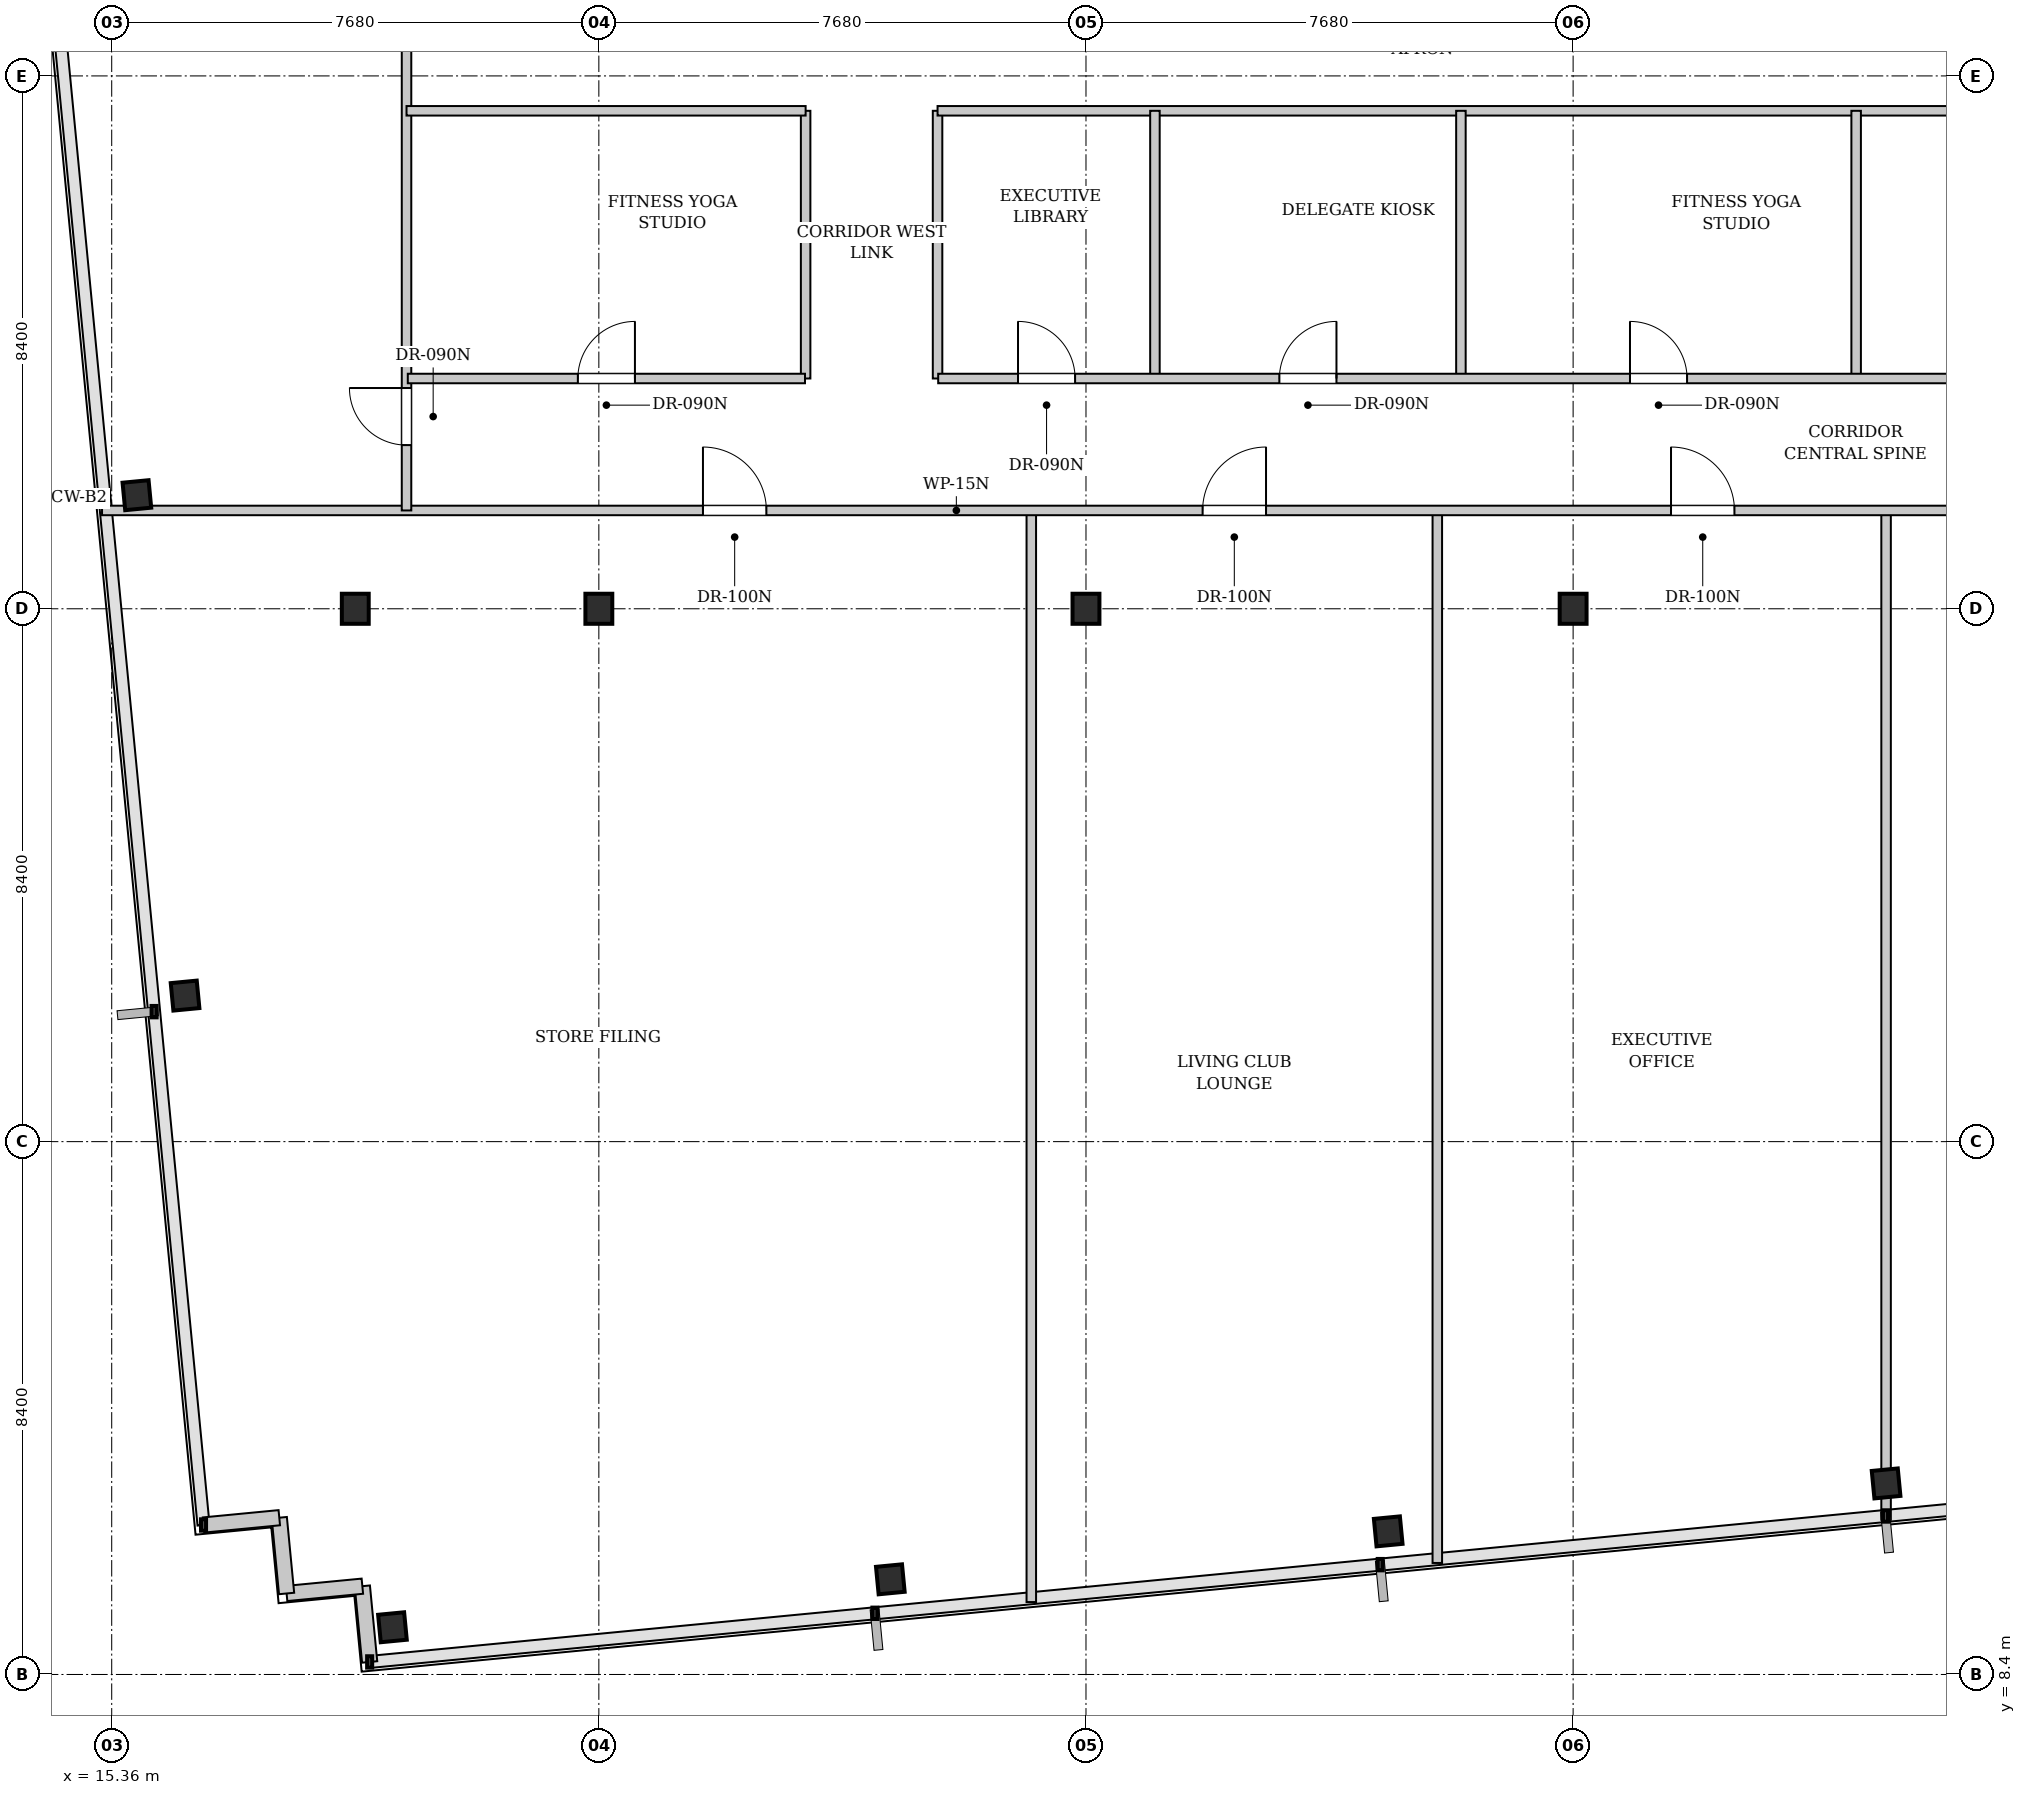
"""IFC4 building model, lengths in metres.
Left out: names, types, materials, properties, quantities, classifications, styles, units other than length and angle.
Written with IfcOpenShell. Run it as: python <this file> out.ifc"""

import sys

from ifc_helpers import new_model, si_unit, direction, frame, frame_2d, origin, origin_2d, place, context, subcontext, project, spatial, rectangle, i_section, extrude, element, fill, save


model = new_model("IFC4")
c1 = context("Model", 3, precision=1e-05, world=origin(), true_north=direction((0.0, 1.0)))
c2 = subcontext(c1, "Body", "Model", "MODEL_VIEW")
j1 = project(units=[si_unit("LENGTHUNIT", "METRE"), si_unit("PLANEANGLEUNIT", "RADIAN")], contexts=[c1])
p1 = place(None, origin())
s1 = spatial("IfcSite", under=j1, at=p1, CompositionType="ELEMENT")
p2 = place(p1, origin())
s2 = spatial("IfcBuilding", under=s1, at=p2, CompositionType="ELEMENT")
p3 = place(p2, frame((0.0, 0.0, 106.7)))
s3 = spatial("IfcBuildingStorey", under=s2, at=p3, CompositionType="ELEMENT", Elevation=106.7)
for number, where, z_axis, x_axis in (
    (1, (23.04, 25.2, 0.0), (0.0, 0.0, 1.0), (1.0, 0.0, 0.0)),
    (2, (30.72, 25.2, 0.0), (0.0, 0.0, 1.0), (1.0, 0.0, 0.0)),
    (3, (38.4, 25.2, 0.0), (0.0, 0.0, 1.0), (1.0, 0.0, 0.0)),
    (4, (19.2, 25.2, 0.0), (0.0, 0.0, 1.0), (1.0, 0.0, 0.0)),
):
    element("IfcColumn", number, at=place(p3, frame(where, z_axis=z_axis, x_axis=x_axis)), inside=s3, PredefinedType="COLUMN", context=c2, shape_type="SweptSolid", body=[
        extrude(i_section(OverallWidth=0.424, OverallDepth=0.474, WebThickness=0.047, FlangeThickness=0.077, FilletRadius=0.015, at=origin_2d()), origin(), (0.0, 0.0, 1.0), 3.4),
    ])
for number, where, z_axis, x_axis in (
    (5, (19.786, 9.144, 0.0), (0.0, 0.0, 1.0), (0.995, 0.096, 0.0)),
    (6, (27.635, 9.9, 0.0), (0.0, 0.0, 1.0), (0.995, 0.096, 0.0)),
    (7, (35.485, 10.656, 0.0), (0.0, 0.0, 1.0), (0.995, 0.096, 0.0)),
    (8, (43.334, 11.412, 0.0), (0.0, 0.0, 1.0), (0.995, 0.096, 0.0)),
    (9, (16.517, 19.102, 0.0), (0.0, 0.0, 1.0), (0.995, 0.096, 0.0)),
    (10, (15.757, 26.99, 0.0), (0.0, 0.0, 1.0), (0.995, 0.096, 0.0)),
):
    element("IfcColumn", number, at=place(p3, frame(where, z_axis=z_axis, x_axis=x_axis)), inside=s3, PredefinedType="COLUMN", context=c2, shape_type="SweptSolid", body=[
        extrude(i_section(OverallWidth=0.412, OverallDepth=0.435, WebThickness=0.036, FlangeThickness=0.058, FilletRadius=0.015, at=origin_2d()), origin(), (0.0, 0.0, 1.0), 3.4),
    ])
for number, where, z_axis, x_axis in (
    (11, (19.427, 8.597, 0.0), (0.0, 0.0, 1.0), (-0.096, 0.995, 0.0)),
    (12, (19.312, 9.792, 0.0), (0.0, 0.0, 1.0), (-0.995, -0.096, 0.0)),
):
    element("IfcWall", number, at=place(p3, frame(where, z_axis=z_axis, x_axis=x_axis)), inside=s3, PredefinedType="SOLIDWALL", context=c2, shape_type="SweptSolid", body=[
        extrude(rectangle(XDim=1.2, YDim=0.24, at=frame_2d((0.6, 0.0))), origin(), (0.0, 0.0, 1.0), 3.18),
    ])
p4 = place(p3, frame((18.117, 9.677, 0.0), z_axis=(0.0, 0.0, 1.0), x_axis=(-0.095836473879, 0.995397091755, 0.0)))
e13 = element("IfcWall", 13, at=p4, inside=s3, PredefinedType="SOLIDWALL", context=c2, shape_type="SweptSolid", body=[
    extrude(rectangle(XDim=1.2, YDim=0.24, at=frame_2d((0.6, 0.0))), origin(), (0.0, 0.0, 1.0), 3.18),
])
p5 = place(p3, frame((18.002, 10.871, 0.0), z_axis=(0.0, 0.0, 1.0), x_axis=(-0.995398960025, -0.095817067274, 0.0)))
e14 = element("IfcWall", 14, at=p5, inside=s3, PredefinedType="SOLIDWALL", context=c2, shape_type="SweptSolid", body=[
    extrude(rectangle(XDim=1.2, YDim=0.24, at=frame_2d((0.6, 0.0))), origin(), (0.0, 0.0, 1.0), 3.18),
])
p6 = place(p3, frame((29.858, 9.542, 0.0), z_axis=(0.0, 0.0, 1.0), x_axis=(0.0, 1.0, 0.0)))
e15 = element("IfcWall", 15, at=p6, inside=s3, PredefinedType="PARTITIONING", context=c2, shape_type="SweptSolid", body=[
    extrude(rectangle(XDim=17.229, YDim=0.15, at=frame_2d((8.614, 0.0))), origin(), (0.0, 0.0, 1.0), 2.525),
])
p7 = place(p3, frame((36.259, 10.158, 0.0), z_axis=(0.0, 0.0, 1.0), x_axis=(0.0, 1.0, 0.0)))
e16 = element("IfcWall", 16, at=p7, inside=s3, PredefinedType="PARTITIONING", context=c2, shape_type="SweptSolid", body=[
    extrude(rectangle(XDim=16.612, YDim=0.15, at=frame_2d((8.306, 0.0))), origin(), (0.0, 0.0, 1.0), 2.525),
])
p8 = place(p3, frame((43.334, 10.839, 0.0), z_axis=(0.0, 0.0, 1.0), x_axis=(0.0, 1.0, 0.0)))
e17 = element("IfcWall", 17, at=p8, inside=s3, PredefinedType="PARTITIONING", context=c2, shape_type="SweptSolid", body=[
    extrude(rectangle(XDim=15.931, YDim=0.15, at=frame_2d((7.965, 0.0))), origin(), (0.0, 0.0, 1.0), 2.525),
])
p9 = place(p3, frame((15.208, 26.75, 0.0), z_axis=(0.0, 0.0, 1.0), x_axis=(1.0, 0.0, 0.0)))
e18 = element("IfcWall", 18, at=p9, inside=s3, PredefinedType="PARTITIONING", context=c2, shape_type="SweptSolid", body=[
    extrude(rectangle(XDim=61.222, YDim=0.15, at=frame_2d((30.611, 0.0))), origin(), (0.0, 0.0, 1.0), 2.525),
])
p10 = place(p9, frame((9.474, 0.0, 0.0)))
e19 = element("IfcOpeningElement", 19, at=p10, cuts=e18, PredefinedType="OPENING", context=c2, shape_type="SweptSolid", body=[
    extrude(rectangle(XDim=1.0, YDim=2.15, at=frame_2d((0.5, 1.075))), frame((0.0, 0.085, 0.0), z_axis=(0.0, -1.0, 0.0), x_axis=(1.0, 0.0, 0.0)), (0.0, 0.0, 1.0), 0.17),
])
p11 = place(p9, frame((17.351, 0.0, 0.0)))
e20 = element("IfcOpeningElement", 20, at=p11, cuts=e18, PredefinedType="OPENING", context=c2, shape_type="SweptSolid", body=[
    extrude(rectangle(XDim=1.0, YDim=2.15, at=frame_2d((0.5, 1.075))), frame((0.0, 0.085, 0.0), z_axis=(0.0, -1.0, 0.0), x_axis=(1.0, 0.0, 0.0)), (0.0, 0.0, 1.0), 0.17),
])
p12 = place(p9, frame((24.736, 0.0, 0.0)))
e21 = element("IfcOpeningElement", 21, at=p12, cuts=e18, PredefinedType="OPENING", context=c2, shape_type="SweptSolid", body=[
    extrude(rectangle(XDim=1.0, YDim=2.15, at=frame_2d((0.5, 1.075))), frame((0.0, 0.085, 0.0), z_axis=(0.0, -1.0, 0.0), x_axis=(1.0, 0.0, 0.0)), (0.0, 0.0, 1.0), 0.17),
])
p13 = place(p9, frame((32.429, 0.0, 0.0)))
e22 = element("IfcOpeningElement", 22, at=p13, cuts=e18, PredefinedType="OPENING", context=c2, shape_type="SweptSolid", body=[
    extrude(rectangle(XDim=1.0, YDim=2.15, at=frame_2d((0.5, 1.075))), frame((0.0, 0.085, 0.0), z_axis=(0.0, -1.0, 0.0), x_axis=(1.0, 0.0, 0.0)), (0.0, 0.0, 1.0), 0.17),
])
p14 = place(p9, frame((35.993, 0.0, 0.0)))
e23 = element("IfcOpeningElement", 23, at=p14, cuts=e18, PredefinedType="OPENING", context=c2, shape_type="SweptSolid", body=[
    extrude(rectangle(XDim=1.0, YDim=2.15, at=frame_2d((0.5, 1.075))), frame((0.0, 0.085, 0.0), z_axis=(0.0, -1.0, 0.0), x_axis=(1.0, 0.0, 0.0)), (0.0, 0.0, 1.0), 0.17),
])
p15 = place(p9, frame((43.982, 0.0, 0.0)))
e24 = element("IfcOpeningElement", 24, at=p15, cuts=e18, PredefinedType="OPENING", context=c2, shape_type="SweptSolid", body=[
    extrude(rectangle(XDim=1.0, YDim=2.15, at=frame_2d((0.5, 1.075))), frame((0.0, 0.085, 0.0), z_axis=(0.0, -1.0, 0.0), x_axis=(1.0, 0.0, 0.0)), (0.0, 0.0, 1.0), 0.17),
])
p16 = place(p9, frame((50.267, 0.0, 0.0)))
e25 = element("IfcOpeningElement", 25, at=p16, cuts=e18, PredefinedType="OPENING", context=c2, shape_type="SweptSolid", body=[
    extrude(rectangle(XDim=1.0, YDim=2.15, at=frame_2d((0.5, 1.075))), frame((0.0, 0.085, 0.0), z_axis=(0.0, -1.0, 0.0), x_axis=(1.0, 0.0, 0.0)), (0.0, 0.0, 1.0), 0.17),
])
p17 = place(p3, frame((20.008, 26.75, 0.0), z_axis=(0.0, 0.0, 1.0), x_axis=(0.0, 1.0, 0.0)))
e26 = element("IfcWall", 26, at=p17, inside=s3, PredefinedType="PARTITIONING", context=c2, shape_type="SweptSolid", body=[
    extrude(rectangle(XDim=19.456, YDim=0.15, at=frame_2d((9.728, 0.0))), origin(), (0.0, 0.0, 1.0), 3.18),
])
p18 = place(p17, frame((1.03, 0.0, 0.0)))
e27 = element("IfcOpeningElement", 27, at=p18, cuts=e26, PredefinedType="OPENING", context=c2, shape_type="SweptSolid", body=[
    extrude(rectangle(XDim=0.9, YDim=2.15, at=frame_2d((0.45, 1.075))), frame((0.0, 0.085, 0.0), z_axis=(0.0, -1.0, 0.0), x_axis=(1.0, 0.0, 0.0)), (0.0, 0.0, 1.0), 0.17),
])
for number, where, z_axis, x_axis in (
    (28, (26.3, 28.83, 0.0), (0.0, 0.0, 1.0), (0.0, 1.0, 0.0)),
    (29, (28.38, 28.83, 0.0), (0.0, 0.0, 1.0), (0.0, 1.0, 0.0)),
):
    element("IfcWall", number, at=place(p3, frame(where, z_axis=z_axis, x_axis=x_axis)), inside=s3, PredefinedType="PARTITIONING", context=c2, shape_type="SweptSolid", body=[
        extrude(rectangle(XDim=4.22, YDim=0.15, at=frame_2d((2.11, 0.0))), origin(), (0.0, 0.0, 1.0), 3.18),
    ])
p19 = place(p3, frame((20.008, 33.05, 0.0), z_axis=(0.0, 0.0, 1.0), x_axis=(1.0, 0.0, 0.0)))
e30 = element("IfcWall", 30, at=p19, inside=s3, PredefinedType="PARTITIONING", context=c2, shape_type="SweptSolid", body=[
    extrude(rectangle(XDim=6.292, YDim=0.15, at=frame_2d((3.146, 0.0))), origin(), (0.0, 0.0, 1.0), 3.18),
])
p20 = place(p3, frame((28.38, 33.05, 0.0), z_axis=(0.0, 0.0, 1.0), x_axis=(1.0, 0.0, 0.0)))
e31 = element("IfcWall", 31, at=p20, inside=s3, PredefinedType="PARTITIONING", context=c2, shape_type="SweptSolid", body=[
    extrude(rectangle(XDim=20.12, YDim=0.15, at=frame_2d((10.06, 0.0))), origin(), (0.0, 0.0, 1.0), 3.18),
])
p21 = place(p3, frame((20.028, 28.83, 0.0), z_axis=(0.0, 0.0, 1.0), x_axis=(1.0, 0.0, 0.0)))
e32 = element("IfcWall", 32, at=p21, inside=s3, PredefinedType="PARTITIONING", context=c2, shape_type="SweptSolid", body=[
    extrude(rectangle(XDim=6.262, YDim=0.15, at=frame_2d((3.131, 0.0))), origin(), (0.0, 0.0, 1.0), 3.18),
])
p22 = place(p21, frame((2.681, 0.0, 0.0)))
e33 = element("IfcOpeningElement", 33, at=p22, cuts=e32, PredefinedType="OPENING", context=c2, shape_type="SweptSolid", body=[
    extrude(rectangle(XDim=0.9, YDim=2.15, at=frame_2d((0.45, 1.075))), frame((0.0, 0.085, 0.0), z_axis=(0.0, -1.0, 0.0), x_axis=(1.0, 0.0, 0.0)), (0.0, 0.0, 1.0), 0.17),
])
for number, where, z_axis, x_axis in (
    (34, (31.807, 28.83, 0.0), (0.0, 0.0, 1.0), (0.0, 1.0, 0.0)),
    (35, (36.631, 28.83, 0.0), (0.0, 0.0, 1.0), (0.0, 1.0, 0.0)),
    (36, (42.862, 28.83, 0.0), (0.0, 0.0, 1.0), (0.0, 1.0, 0.0)),
):
    element("IfcWall", number, at=place(p3, frame(where, z_axis=z_axis, x_axis=x_axis)), inside=s3, PredefinedType="PARTITIONING", context=c2, shape_type="SweptSolid", body=[
        extrude(rectangle(XDim=4.22, YDim=0.15, at=frame_2d((2.11, 0.0))), origin(), (0.0, 0.0, 1.0), 3.18),
    ])
p23 = place(p3, frame((28.39, 28.83, 0.0), z_axis=(0.0, 0.0, 1.0), x_axis=(1.0, 0.0, 0.0)))
e37 = element("IfcWall", 37, at=p23, inside=s3, PredefinedType="PARTITIONING", context=c2, shape_type="SweptSolid", body=[
    extrude(rectangle(XDim=20.1, YDim=0.15, at=frame_2d((10.05, 0.0))), origin(), (0.0, 0.0, 1.0), 3.18),
])
p24 = place(p23, frame((1.259, 0.0, 0.0)))
e38 = element("IfcOpeningElement", 38, at=p24, cuts=e37, PredefinedType="OPENING", context=c2, shape_type="SweptSolid", body=[
    extrude(rectangle(XDim=0.9, YDim=2.15, at=frame_2d((0.45, 1.075))), frame((0.0, 0.085, 0.0), z_axis=(0.0, -1.0, 0.0), x_axis=(1.0, 0.0, 0.0)), (0.0, 0.0, 1.0), 0.17),
])
p25 = place(p23, frame((5.379, 0.0, 0.0)))
e39 = element("IfcOpeningElement", 39, at=p25, cuts=e37, PredefinedType="OPENING", context=c2, shape_type="SweptSolid", body=[
    extrude(rectangle(XDim=0.9, YDim=2.15, at=frame_2d((0.45, 1.075))), frame((0.0, 0.085, 0.0), z_axis=(0.0, -1.0, 0.0), x_axis=(1.0, 0.0, 0.0)), (0.0, 0.0, 1.0), 0.17),
])
p26 = place(p23, frame((10.906, 0.0, 0.0)))
e40 = element("IfcOpeningElement", 40, at=p26, cuts=e37, PredefinedType="OPENING", context=c2, shape_type="SweptSolid", body=[
    extrude(rectangle(XDim=0.9, YDim=2.15, at=frame_2d((0.45, 1.075))), frame((0.0, 0.085, 0.0), z_axis=(0.0, -1.0, 0.0), x_axis=(1.0, 0.0, 0.0)), (0.0, 0.0, 1.0), 0.17),
])
p27 = place(p23, frame((16.836, 0.0, 0.0)))
e41 = element("IfcOpeningElement", 41, at=p27, cuts=e37, PredefinedType="OPENING", context=c2, shape_type="SweptSolid", body=[
    extrude(rectangle(XDim=0.9, YDim=2.15, at=frame_2d((0.45, 1.075))), frame((0.0, 0.085, 0.0), z_axis=(0.0, -1.0, 0.0), x_axis=(1.0, 0.0, 0.0)), (0.0, 0.0, 1.0), 0.17),
])
p28 = place(p10, origin())
e42 = element("IfcDoor", 42, at=p28, inside=s3, OperationType="SINGLE_SWING_LEFT", PredefinedType="DOOR", context=c2, shape_type="SweptSolid", body=[
    extrude(rectangle(XDim=1.0, YDim=2.15, at=frame_2d((0.5, 1.075))), frame((0.0, 0.025, 0.0), z_axis=(0.0, -1.0, 0.0), x_axis=(1.0, 0.0, 0.0)), (0.0, 0.0, 1.0), 0.05),
])
fill(e19, e42)
p29 = place(p11, origin())
e43 = element("IfcDoor", 43, at=p29, inside=s3, OperationType="SINGLE_SWING_RIGHT", PredefinedType="DOOR", context=c2, shape_type="SweptSolid", body=[
    extrude(rectangle(XDim=1.0, YDim=2.15, at=frame_2d((0.5, 1.075))), frame((0.0, 0.025, 0.0), z_axis=(0.0, -1.0, 0.0), x_axis=(1.0, 0.0, 0.0)), (0.0, 0.0, 1.0), 0.05),
])
fill(e20, e43)
p30 = place(p12, origin())
e44 = element("IfcDoor", 44, at=p30, inside=s3, OperationType="SINGLE_SWING_LEFT", PredefinedType="DOOR", context=c2, shape_type="SweptSolid", body=[
    extrude(rectangle(XDim=1.0, YDim=2.15, at=frame_2d((0.5, 1.075))), frame((0.0, 0.025, 0.0), z_axis=(0.0, -1.0, 0.0), x_axis=(1.0, 0.0, 0.0)), (0.0, 0.0, 1.0), 0.05),
])
fill(e21, e44)
p31 = place(p18, origin())
e45 = element("IfcDoor", 45, at=p31, inside=s3, OperationType="SINGLE_SWING_RIGHT", PredefinedType="DOOR", context=c2, shape_type="SweptSolid", body=[
    extrude(rectangle(XDim=0.9, YDim=2.15, at=frame_2d((0.45, 1.075))), frame((0.0, 0.025, 0.0), z_axis=(0.0, -1.0, 0.0), x_axis=(1.0, 0.0, 0.0)), (0.0, 0.0, 1.0), 0.05),
])
fill(e27, e45)
p32 = place(p22, origin())
e46 = element("IfcDoor", 46, at=p32, inside=s3, OperationType="SINGLE_SWING_RIGHT", PredefinedType="DOOR", context=c2, shape_type="SweptSolid", body=[
    extrude(rectangle(XDim=0.9, YDim=2.15, at=frame_2d((0.45, 1.075))), frame((0.0, 0.025, 0.0), z_axis=(0.0, -1.0, 0.0), x_axis=(1.0, 0.0, 0.0)), (0.0, 0.0, 1.0), 0.05),
])
fill(e33, e46)
p33 = place(p24, origin())
e47 = element("IfcDoor", 47, at=p33, inside=s3, OperationType="SINGLE_SWING_LEFT", PredefinedType="DOOR", context=c2, shape_type="SweptSolid", body=[
    extrude(rectangle(XDim=0.9, YDim=2.15, at=frame_2d((0.45, 1.075))), frame((0.0, 0.025, 0.0), z_axis=(0.0, -1.0, 0.0), x_axis=(1.0, 0.0, 0.0)), (0.0, 0.0, 1.0), 0.05),
])
fill(e38, e47)
p34 = place(p25, origin())
e48 = element("IfcDoor", 48, at=p34, inside=s3, OperationType="SINGLE_SWING_RIGHT", PredefinedType="DOOR", context=c2, shape_type="SweptSolid", body=[
    extrude(rectangle(XDim=0.9, YDim=2.15, at=frame_2d((0.45, 1.075))), frame((0.0, 0.025, 0.0), z_axis=(0.0, -1.0, 0.0), x_axis=(1.0, 0.0, 0.0)), (0.0, 0.0, 1.0), 0.05),
])
fill(e39, e48)
p35 = place(p26, origin())
e49 = element("IfcDoor", 49, at=p35, inside=s3, OperationType="SINGLE_SWING_LEFT", PredefinedType="DOOR", context=c2, shape_type="SweptSolid", body=[
    extrude(rectangle(XDim=0.9, YDim=2.15, at=frame_2d((0.45, 1.075))), frame((0.0, 0.025, 0.0), z_axis=(0.0, -1.0, 0.0), x_axis=(1.0, 0.0, 0.0)), (0.0, 0.0, 1.0), 0.05),
])
fill(e40, e49)
save(model, sys.argv[1])
